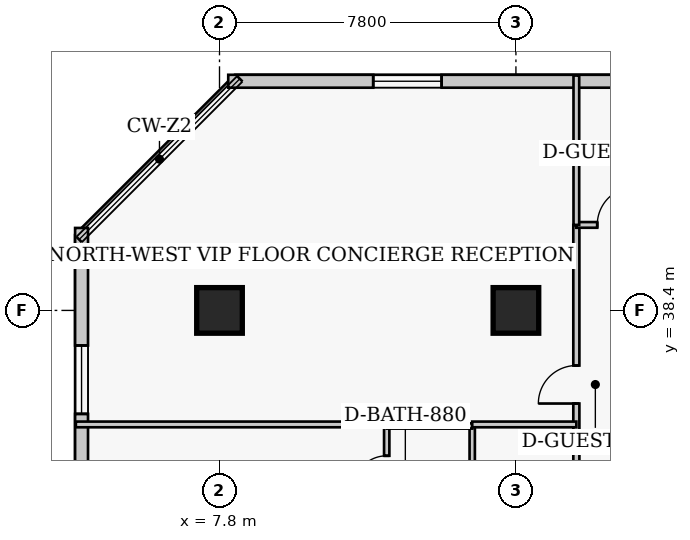
"""IFC4 building model, lengths in metres.
Left out: names, types, materials, properties, quantities, classifications, styles, units other than length and angle.
Written with IfcOpenShell. Run it as: python <this file> out.ifc"""

import sys

from ifc_helpers import new_model, si_unit, direction, frame, frame_2d, origin, origin_2d, place, context, subcontext, project, spatial, rectangle, extrude, element, fill, save


model = new_model("IFC4")
c1 = context("Model", 3, precision=1e-05, world=origin(), true_north=direction((0.0, 1.0)))
c2 = subcontext(c1, "Body", "Model", "MODEL_VIEW")
j1 = project(units=[si_unit("LENGTHUNIT", "METRE"), si_unit("PLANEANGLEUNIT", "RADIAN")], contexts=[c1])
p1 = place(None, origin())
s1 = spatial("IfcSite", under=j1, at=p1, CompositionType="ELEMENT")
p2 = place(p1, origin())
s2 = spatial("IfcBuilding", under=s1, at=p2, CompositionType="ELEMENT")
p3 = place(p2, frame((0.0, 0.0, 114.6)))
s3 = spatial("IfcBuildingStorey", under=s2, at=p3, CompositionType="ELEMENT", Elevation=114.6)
for number, where, z_axis, x_axis in (
    (1, (7.8, 38.4, 0.0), (0.0, 0.0, 1.0), (1.0, 0.0, 0.0)),
    (2, (15.6, 38.4, 0.0), (0.0, 0.0, 1.0), (1.0, 0.0, 0.0)),
):
    element("IfcColumn", number, at=place(p3, frame(where, z_axis=z_axis, x_axis=x_axis)), inside=s3, PredefinedType="COLUMN", context=c2, shape_type="SweptSolid", body=[
        extrude(rectangle(XDim=1.2, YDim=1.2, at=origin_2d()), origin(), (0.0, 0.0, 1.0), 3.8),
    ])
p4 = place(p3, frame((36.32, 44.43, 0.0), z_axis=(0.0, 0.0, 1.0), x_axis=(-1.0, 0.0, 0.0)))
e3 = element("IfcWall", 3, at=p4, inside=s3, PredefinedType="SOLIDWALL", context=c2, shape_type="SweptSolid", body=[
    extrude(rectangle(XDim=28.29, YDim=0.34, at=frame_2d((14.145, 0.0))), origin(), (0.0, 0.0, 1.0), 3.54),
])
p5 = place(p4, frame((3.815, 0.0, 0.85)))
e4 = element("IfcOpeningElement", 4, at=p5, cuts=e3, PredefinedType="OPENING", context=c2, shape_type="SweptSolid", body=[
    extrude(rectangle(XDim=1.8, YDim=1.8, at=frame_2d((0.9, 0.9))), frame((0.0, 0.18, 0.0), z_axis=(0.0, -1.0, 0.0), x_axis=(1.0, 0.0, 0.0)), (0.0, 0.0, 1.0), 0.36),
])
p6 = place(p4, frame((13.245, 0.0, 0.85)))
e5 = element("IfcOpeningElement", 5, at=p6, cuts=e3, PredefinedType="OPENING", context=c2, shape_type="SweptSolid", body=[
    extrude(rectangle(XDim=1.8, YDim=1.8, at=frame_2d((0.9, 0.9))), frame((0.0, 0.18, 0.0), z_axis=(0.0, -1.0, 0.0), x_axis=(1.0, 0.0, 0.0)), (0.0, 0.0, 1.0), 0.36),
])
p7 = place(p4, frame((22.675, 0.0, 0.85)))
e6 = element("IfcOpeningElement", 6, at=p7, cuts=e3, PredefinedType="OPENING", context=c2, shape_type="SweptSolid", body=[
    extrude(rectangle(XDim=1.8, YDim=1.8, at=frame_2d((0.9, 0.9))), frame((0.0, 0.18, 0.0), z_axis=(0.0, -1.0, 0.0), x_axis=(1.0, 0.0, 0.0)), (0.0, 0.0, 1.0), 0.36),
])
p8 = place(p3, frame((4.17, 40.57, 0.0), z_axis=(0.0, 0.0, 1.0), x_axis=(0.0, -1.0, 0.0)))
e7 = element("IfcWall", 7, at=p8, inside=s3, PredefinedType="SOLIDWALL", context=c2, shape_type="SweptSolid", body=[
    extrude(rectangle(XDim=31.94, YDim=0.34, at=frame_2d((15.97, 0.0))), origin(), (0.0, 0.0, 1.0), 3.54),
])
p9 = place(p8, frame((3.093, 0.0, 0.85)))
e8 = element("IfcOpeningElement", 8, at=p9, cuts=e7, PredefinedType="OPENING", context=c2, shape_type="SweptSolid", body=[
    extrude(rectangle(XDim=1.8, YDim=1.8, at=frame_2d((0.9, 0.9))), frame((0.0, 0.18, 0.0), z_axis=(0.0, -1.0, 0.0), x_axis=(1.0, 0.0, 0.0)), (0.0, 0.0, 1.0), 0.36),
])
p10 = place(p8, frame((12.228, 0.0, 0.85)))
e9 = element("IfcOpeningElement", 9, at=p10, cuts=e7, PredefinedType="OPENING", context=c2, shape_type="SweptSolid", body=[
    extrude(rectangle(XDim=1.8, YDim=1.8, at=frame_2d((0.9, 0.9))), frame((0.0, 0.18, 0.0), z_axis=(0.0, -1.0, 0.0), x_axis=(1.0, 0.0, 0.0)), (0.0, 0.0, 1.0), 0.36),
])
p11 = place(p8, frame((18.413, 0.0, 0.85)))
e10 = element("IfcOpeningElement", 10, at=p11, cuts=e7, PredefinedType="OPENING", context=c2, shape_type="SweptSolid", body=[
    extrude(rectangle(XDim=1.8, YDim=1.8, at=frame_2d((0.9, 0.9))), frame((0.0, 0.18, 0.0), z_axis=(0.0, -1.0, 0.0), x_axis=(1.0, 0.0, 0.0)), (0.0, 0.0, 1.0), 0.36),
])
p12 = place(p8, frame((27.048, 0.0, 0.85)))
e11 = element("IfcOpeningElement", 11, at=p12, cuts=e7, PredefinedType="OPENING", context=c2, shape_type="SweptSolid", body=[
    extrude(rectangle(XDim=1.8, YDim=1.8, at=frame_2d((0.9, 0.9))), frame((0.0, 0.18, 0.0), z_axis=(0.0, -1.0, 0.0), x_axis=(1.0, 0.0, 0.0)), (0.0, 0.0, 1.0), 0.36),
])
p13 = place(p8, frame((7.81, 0.0, 0.85)))
e12 = element("IfcOpeningElement", 12, at=p13, cuts=e7, PredefinedType="OPENING", context=c2, shape_type="SweptSolid", body=[
    extrude(rectangle(XDim=1.3, YDim=1.7, at=frame_2d((0.65, 0.85))), frame((0.0, 0.18, 0.0), z_axis=(0.0, -1.0, 0.0), x_axis=(1.0, 0.0, 0.0)), (0.0, 0.0, 1.0), 0.36),
])
p14 = place(p3, frame((17.19, 6.65, 0.0), z_axis=(0.0, 0.0, 1.0), x_axis=(0.0, 1.0, 0.0)))
e13 = element("IfcWall", 13, at=p14, inside=s3, PredefinedType="PARTITIONING", context=c2, shape_type="SweptSolid", body=[
    extrude(rectangle(XDim=34.0, YDim=0.16, at=frame_2d((17.0, 0.0))), origin(), (0.0, 0.0, 1.0), 3.54),
])
p15 = place(p14, frame((1.8, 0.0, 0.0)))
e14 = element("IfcOpeningElement", 14, at=p15, cuts=e13, PredefinedType="OPENING", context=c2, shape_type="SweptSolid", body=[
    extrude(rectangle(XDim=0.95, YDim=2.1, at=frame_2d((0.475, 1.05))), frame((0.0, 0.09, 0.0), z_axis=(0.0, -1.0, 0.0), x_axis=(1.0, 0.0, 0.0)), (0.0, 0.0, 1.0), 0.18),
])
p16 = place(p14, frame((8.475, 0.0, 0.0)))
e15 = element("IfcOpeningElement", 15, at=p16, cuts=e13, PredefinedType="OPENING", context=c2, shape_type="SweptSolid", body=[
    extrude(rectangle(XDim=0.95, YDim=2.1, at=frame_2d((0.475, 1.05))), frame((0.0, 0.09, 0.0), z_axis=(0.0, -1.0, 0.0), x_axis=(1.0, 0.0, 0.0)), (0.0, 0.0, 1.0), 0.18),
])
p17 = place(p14, frame((17.275, 0.0, 0.0)))
e16 = element("IfcOpeningElement", 16, at=p17, cuts=e13, PredefinedType="OPENING", context=c2, shape_type="SweptSolid", body=[
    extrude(rectangle(XDim=0.95, YDim=2.1, at=frame_2d((0.475, 1.05))), frame((0.0, 0.09, 0.0), z_axis=(0.0, -1.0, 0.0), x_axis=(1.0, 0.0, 0.0)), (0.0, 0.0, 1.0), 0.18),
])
p18 = place(p14, frame((24.975, 0.0, 0.0)))
e17 = element("IfcOpeningElement", 17, at=p18, cuts=e13, PredefinedType="OPENING", context=c2, shape_type="SweptSolid", body=[
    extrude(rectangle(XDim=0.95, YDim=2.1, at=frame_2d((0.475, 1.05))), frame((0.0, 0.09, 0.0), z_axis=(0.0, -1.0, 0.0), x_axis=(1.0, 0.0, 0.0)), (0.0, 0.0, 1.0), 0.18),
])
p19 = place(p14, frame((29.3, 0.0, 0.0)))
e18 = element("IfcOpeningElement", 18, at=p19, cuts=e13, PredefinedType="OPENING", context=c2, shape_type="SweptSolid", body=[
    extrude(rectangle(XDim=1.0, YDim=2.15, at=frame_2d((0.5, 1.075))), frame((0.0, 0.09, 0.0), z_axis=(0.0, -1.0, 0.0), x_axis=(1.0, 0.0, 0.0)), (0.0, 0.0, 1.0), 0.18),
])
p20 = place(p3, frame((17.19, 40.65, 0.0), z_axis=(0.0, 0.0, 1.0), x_axis=(1.0, 0.0, 0.0)))
e19 = element("IfcWall", 19, at=p20, inside=s3, PredefinedType="PARTITIONING", context=c2, shape_type="SweptSolid", body=[
    extrude(rectangle(XDim=4.91, YDim=0.15, at=frame_2d((2.455, 0.0))), origin(), (0.0, 0.0, 1.0), 3.54),
])
p21 = place(p20, frame((0.55, 0.0, 0.0)))
e20 = element("IfcOpeningElement", 20, at=p21, cuts=e19, PredefinedType="OPENING", context=c2, shape_type="SweptSolid", body=[
    extrude(rectangle(XDim=1.0, YDim=2.15, at=frame_2d((0.5, 1.075))), frame((0.0, 0.085, 0.0), z_axis=(0.0, -1.0, 0.0), x_axis=(1.0, 0.0, 0.0)), (0.0, 0.0, 1.0), 0.17),
])
p22 = place(p3, frame((17.19, 40.65, 0.0), z_axis=(0.0, 0.0, 1.0), x_axis=(0.0, 1.0, 0.0)))
e21 = element("IfcWall", 21, at=p22, inside=s3, PredefinedType="PARTITIONING", context=c2, shape_type="SweptSolid", body=[
    extrude(rectangle(XDim=3.93, YDim=0.15, at=frame_2d((1.965, 0.0))), origin(), (0.0, 0.0, 1.0), 3.54),
])
p23 = place(p3, frame((12.2, 32.91, 0.0), z_axis=(0.0, 0.0, 1.0), x_axis=(0.0, 1.0, 0.0)))
e22 = element("IfcWall", 22, at=p23, inside=s3, PredefinedType="PLUMBINGWALL", context=c2, shape_type="SweptSolid", body=[
    extrude(rectangle(XDim=2.45, YDim=0.14, at=frame_2d((1.225, 0.0))), origin(), (0.0, 0.0, 1.0), 3.54),
])
p24 = place(p23, frame((0.785, 0.0, 0.0)))
e23 = element("IfcOpeningElement", 23, at=p24, cuts=e22, PredefinedType="OPENING", context=c2, shape_type="SweptSolid", body=[
    extrude(rectangle(XDim=0.88, YDim=2.05, at=frame_2d((0.44, 1.025))), frame((0.0, 0.08, 0.0), z_axis=(0.0, -1.0, 0.0), x_axis=(1.0, 0.0, 0.0)), (0.0, 0.0, 1.0), 0.16),
])
p25 = place(p3, frame((14.45, 32.91, 0.0), z_axis=(0.0, 0.0, 1.0), x_axis=(0.0, 1.0, 0.0)))
e24 = element("IfcWall", 24, at=p25, inside=s3, PredefinedType="PLUMBINGWALL", context=c2, shape_type="SweptSolid", body=[
    extrude(rectangle(XDim=2.45, YDim=0.14, at=frame_2d((1.225, 0.0))), origin(), (0.0, 0.0, 1.0), 3.54),
])
p26 = place(p3, frame((12.2, 35.36, 0.0), z_axis=(0.0, 0.0, 1.0), x_axis=(1.0, 0.0, 0.0)))
e25 = element("IfcWall", 25, at=p26, inside=s3, PredefinedType="PLUMBINGWALL", context=c2, shape_type="SweptSolid", body=[
    extrude(rectangle(XDim=2.25, YDim=0.14, at=frame_2d((1.125, 0.0))), origin(), (0.0, 0.0, 1.0), 3.54),
])
p27 = place(p3, frame((4.02, 35.4, 0.0), z_axis=(0.0, 0.0, 1.0), x_axis=(1.0, 0.0, 0.0)))
e26 = element("IfcWall", 26, at=p27, inside=s3, PredefinedType="PARTITIONING", context=c2, shape_type="SweptSolid", body=[
    extrude(rectangle(XDim=8.18, YDim=0.15, at=frame_2d((4.09, 0.0))), origin(), (0.0, 0.0, 1.0), 3.54),
])
p28 = place(p3, frame((14.45, 35.4, 0.0), z_axis=(0.0, 0.0, 1.0), x_axis=(1.0, 0.0, 0.0)))
e27 = element("IfcWall", 27, at=p28, inside=s3, PredefinedType="PARTITIONING", context=c2, shape_type="SweptSolid", body=[
    extrude(rectangle(XDim=2.74, YDim=0.15, at=frame_2d((1.37, 0.0))), origin(), (0.0, 0.0, 1.0), 3.54),
])
p29 = place(p7, origin())
e28 = element("IfcWindow", 28, at=p29, inside=s3, PartitioningType="SINGLE_PANEL", PredefinedType="WINDOW", context=c2, shape_type="SweptSolid", body=[
    extrude(rectangle(XDim=1.8, YDim=1.8, at=frame_2d((0.9, 0.9))), frame((0.0, 0.03, 0.0), z_axis=(0.0, -1.0, 0.0), x_axis=(1.0, 0.0, 0.0)), (0.0, 0.0, 1.0), 0.06),
])
fill(e6, e28)
p30 = place(p9, origin())
e29 = element("IfcWindow", 29, at=p30, inside=s3, PartitioningType="SINGLE_PANEL", PredefinedType="WINDOW", context=c2, shape_type="SweptSolid", body=[
    extrude(rectangle(XDim=1.8, YDim=1.8, at=frame_2d((0.9, 0.9))), frame((0.0, 0.03, 0.0), z_axis=(0.0, -1.0, 0.0), x_axis=(1.0, 0.0, 0.0)), (0.0, 0.0, 1.0), 0.06),
])
fill(e8, e29)
p31 = place(p21, origin())
e30 = element("IfcDoor", 30, at=p31, inside=s3, OperationType="SINGLE_SWING_RIGHT", PredefinedType="DOOR", context=c2, shape_type="SweptSolid", body=[
    extrude(rectangle(XDim=1.0, YDim=2.15, at=frame_2d((0.5, 1.075))), frame((0.0, 0.025, 0.0), z_axis=(0.0, -1.0, 0.0), x_axis=(1.0, 0.0, 0.0)), (0.0, 0.0, 1.0), 0.05),
])
fill(e20, e30)
p32 = place(p24, origin())
e31 = element("IfcDoor", 31, at=p32, inside=s3, OperationType="SINGLE_SWING_LEFT", PredefinedType="DOOR", context=c2, shape_type="SweptSolid", body=[
    extrude(rectangle(XDim=0.88, YDim=2.05, at=frame_2d((0.44, 1.025))), frame((0.0, 0.025, 0.0), z_axis=(0.0, -1.0, 0.0), x_axis=(1.0, 0.0, 0.0)), (0.0, 0.0, 1.0), 0.05),
])
fill(e23, e31)
p33 = place(p19, origin())
e32 = element("IfcDoor", 32, at=p33, inside=s3, OperationType="SINGLE_SWING_LEFT", PredefinedType="DOOR", context=c2, shape_type="SweptSolid", body=[
    extrude(rectangle(XDim=1.0, YDim=2.15, at=frame_2d((0.5, 1.075))), frame((0.0, 0.025, 0.0), z_axis=(0.0, -1.0, 0.0), x_axis=(1.0, 0.0, 0.0)), (0.0, 0.0, 1.0), 0.05),
])
fill(e18, e32)
save(model, sys.argv[1])
